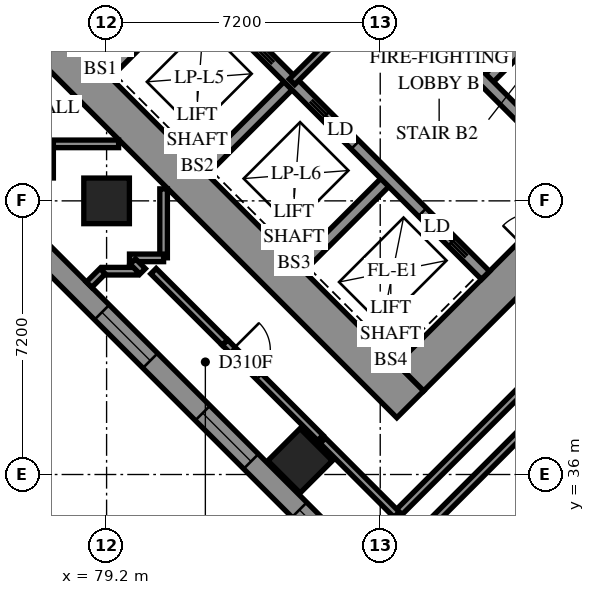
"""IFC4 building model, lengths in metres.
Left out: names, types, materials, properties, quantities, classifications, styles, units other than length and angle.
Written with IfcOpenShell. Run it as: python <this file> out.ifc"""

import sys

from ifc_helpers import new_model, si_unit, direction, frame, frame_2d, origin, origin_2d, place, context, subcontext, project, spatial, polyline, rectangle, outline, extrude, element, fill, save


model = new_model("IFC4")
c1 = context("Model", 3, precision=1e-05, world=origin(), true_north=direction((0.0, 1.0)))
c2 = subcontext(c1, "Body", "Model", "MODEL_VIEW")
j1 = project(units=[si_unit("LENGTHUNIT", "METRE"), si_unit("PLANEANGLEUNIT", "RADIAN")], contexts=[c1])
p1 = place(None, origin())
s1 = spatial("IfcSite", under=j1, at=p1, CompositionType="ELEMENT")
p2 = place(p1, origin())
s2 = spatial("IfcBuilding", under=s1, at=p2, CompositionType="ELEMENT")
p3 = place(p2, frame((0.0, 0.0, 14.4)))
s3 = spatial("IfcBuildingStorey", under=s2, at=p3, CompositionType="ELEMENT", Elevation=14.4)
for number, where, z_axis, x_axis in (
    (1, (79.2, 43.2, 0.0), (0.0, 0.0, 1.0), (1.0, 0.0, 0.0)),
    (2, (84.291, 36.362, 0.0), (0.0, 0.0, 1.0), (0.707, -0.707, 0.0)),
):
    element("IfcColumn", number, at=place(p3, frame(where, z_axis=z_axis, x_axis=x_axis)), inside=s3, PredefinedType="COLUMN", context=c2, shape_type="SweptSolid", body=[
        extrude(rectangle(XDim=1.2, YDim=1.2, at=origin_2d()), origin(), (0.0, 0.0, 1.0), 3.8),
    ])
p4 = place(p3, frame((75.594, 49.443, -0.4), z_axis=(0.0, 0.0, 1.0), x_axis=(0.7071037324, -0.70710983, 0.0)))
e3 = element("IfcWall", 3, at=p4, inside=s3, PredefinedType="SHEAR", context=c2, shape_type="SweptSolid", body=[
    extrude(rectangle(XDim=16.4, YDim=1.0, at=frame_2d((8.2, 0.0))), origin(), (0.0, 0.0, 1.0), 3.5),
])
p5 = place(p3, frame((87.19, 38.554, -0.4), z_axis=(0.0, 0.0, 1.0), x_axis=(0.707103309, 0.7071102534, 0.0)))
e4 = element("IfcWall", 4, at=p5, inside=s3, PredefinedType="SHEAR", context=c2, shape_type="SweptSolid", body=[
    extrude(rectangle(XDim=14.4, YDim=1.0, at=frame_2d((7.2, 0.0))), origin(), (0.0, 0.0, 1.0), 3.5),
])
p6 = place(p5, frame((4.55, 0.0, 0.4)))
e5 = element("IfcOpeningElement", 5, at=p6, cuts=e4, PredefinedType="OPENING", context=c2, shape_type="SweptSolid", body=[
    extrude(rectangle(XDim=1.1, YDim=2.1, at=frame_2d((0.55, 1.05))), frame((0.0, 0.51, 0.0), z_axis=(0.0, -1.0, 0.0), x_axis=(1.0, 0.0, 0.0)), (0.0, 0.0, 1.0), 1.02),
])
p7 = place(p5, frame((11.35, 0.0, 0.4)))
e6 = element("IfcOpeningElement", 6, at=p7, cuts=e4, PredefinedType="OPENING", context=c2, shape_type="SweptSolid", body=[
    extrude(rectangle(XDim=1.1, YDim=2.1, at=frame_2d((0.55, 1.05))), frame((0.0, 0.51, 0.0), z_axis=(0.0, -1.0, 0.0), x_axis=(1.0, 0.0, 0.0)), (0.0, 0.0, 1.0), 1.02),
])
p8 = place(p3, frame((79.2, 46.544, 0.0), z_axis=(0.0, 0.0, 1.0), x_axis=(0.7071219326, 0.7070916295, 0.0)))
e7 = element("IfcWall", 7, at=p8, inside=s3, PredefinedType="SOLIDWALL", context=c2, shape_type="SweptSolid", body=[
    extrude(rectangle(XDim=3.3, YDim=0.3, at=frame_2d((1.65, 0.0))), origin(), (0.0, 0.0, 1.0), 3.8),
])
for number, where, z_axis, x_axis in (
    (8, (81.746, 43.999, 0.0), (0.0, 0.0, 1.0), (0.707, 0.707, 0.0)),
    (9, (84.291, 41.453, 0.0), (0.0, 0.0, 1.0), (0.707, 0.707, 0.0)),
):
    element("IfcWall", number, at=place(p3, frame(where, z_axis=z_axis, x_axis=x_axis)), inside=s3, PredefinedType="SOLIDWALL", context=c2, shape_type="SweptSolid", body=[
        extrude(rectangle(XDim=3.3, YDim=0.3, at=frame_2d((1.65, 0.0))), origin(), (0.0, 0.0, 1.0), 3.8),
    ])
p9 = place(p3, frame((89.17, 46.332, 0.0), z_axis=(0.0, 0.0, 1.0), x_axis=(0.7071067812, 0.7071067812, 0.0)))
e10 = element("IfcWall", 10, at=p9, inside=s3, PredefinedType="SOLIDWALL", context=c2, shape_type="SweptSolid", body=[
    extrude(rectangle(XDim=3.3, YDim=0.3, at=frame_2d((1.65, 0.0))), origin(), (0.0, 0.0, 1.0), 3.8),
])
p10 = place(p3, frame((78.988, 51.423, 0.0), z_axis=(0.0, 0.0, 1.0), x_axis=(0.7071067812, -0.7071067812, 0.0)))
e11 = element("IfcWall", 11, at=p10, inside=s3, PredefinedType="SOLIDWALL", context=c2, shape_type="SweptSolid", body=[
    extrude(rectangle(XDim=14.4, YDim=0.3, at=frame_2d((7.2, 0.0))), origin(), (0.0, 0.0, 1.0), 3.8),
])
p11 = place(p10, frame((1.25, 0.0, 0.0)))
e12 = element("IfcOpeningElement", 12, at=p11, cuts=e11, PredefinedType="OPENING", context=c2, shape_type="SweptSolid", body=[
    extrude(rectangle(XDim=1.1, YDim=2.1, at=frame_2d((0.55, 1.05))), frame((0.0, 0.16, 0.0), z_axis=(0.0, -1.0, 0.0), x_axis=(1.0, 0.0, 0.0)), (0.0, 0.0, 1.0), 0.32),
])
p12 = place(p10, frame((4.85, 0.0, 0.0)))
e13 = element("IfcOpeningElement", 13, at=p12, cuts=e11, PredefinedType="OPENING", context=c2, shape_type="SweptSolid", body=[
    extrude(rectangle(XDim=1.1, YDim=2.1, at=frame_2d((0.55, 1.05))), frame((0.0, 0.16, 0.0), z_axis=(0.0, -1.0, 0.0), x_axis=(1.0, 0.0, 0.0)), (0.0, 0.0, 1.0), 0.32),
])
p13 = place(p10, frame((8.45, 0.0, 0.0)))
e14 = element("IfcOpeningElement", 14, at=p13, cuts=e11, PredefinedType="OPENING", context=c2, shape_type="SweptSolid", body=[
    extrude(rectangle(XDim=1.1, YDim=2.1, at=frame_2d((0.55, 1.05))), frame((0.0, 0.16, 0.0), z_axis=(0.0, -1.0, 0.0), x_axis=(1.0, 0.0, 0.0)), (0.0, 0.0, 1.0), 0.32),
])
p14 = place(p10, frame((12.05, 0.0, 0.0)))
e15 = element("IfcOpeningElement", 15, at=p14, cuts=e11, PredefinedType="OPENING", context=c2, shape_type="SweptSolid", body=[
    extrude(rectangle(XDim=1.1, YDim=2.1, at=frame_2d((0.55, 1.05))), frame((0.0, 0.16, 0.0), z_axis=(0.0, -1.0, 0.0), x_axis=(1.0, 0.0, 0.0)), (0.0, 0.0, 1.0), 0.32),
])
p15 = place(p3, frame((81.534, 53.969, 0.0), z_axis=(0.0, 0.0, 1.0), x_axis=(0.707103309, -0.7071102534, 0.0)))
e16 = element("IfcWall", 16, at=p15, inside=s3, PredefinedType="SOLIDWALL", context=c2, shape_type="SweptSolid", body=[
    extrude(rectangle(XDim=14.4, YDim=0.3, at=frame_2d((7.2, 0.0))), origin(), (0.0, 0.0, 1.0), 3.8),
])
p16 = place(p15, frame((12.05, 0.0, 0.0)))
e17 = element("IfcOpeningElement", 17, at=p16, cuts=e16, PredefinedType="OPENING", context=c2, shape_type="SweptSolid", body=[
    extrude(rectangle(XDim=1.1, YDim=2.1, at=frame_2d((0.55, 1.05))), frame((0.0, 0.16, 0.0), z_axis=(0.0, -1.0, 0.0), x_axis=(1.0, 0.0, 0.0)), (0.0, 0.0, 1.0), 0.32),
])
p17 = place(p3, frame((88.958, 51.211, 0.0), z_axis=(0.0, 0.0, 1.0), x_axis=(0.7070998367, -0.7071137256, 0.0)))
e18 = element("IfcWall", 18, at=p17, inside=s3, PredefinedType="SOLIDWALL", context=c2, shape_type="SweptSolid", body=[
    extrude(rectangle(XDim=7.2, YDim=0.3, at=frame_2d((3.6, 0.0))), origin(), (0.0, 0.0, 1.0), 3.8),
])
p18 = place(p3, frame((117.843, 34.665, 0.0), z_axis=(0.0, 0.0, 1.0), x_axis=(-0.7071067812, 0.7071067812, 0.0)))
e19 = element("IfcWall", 19, at=p18, inside=s3, PredefinedType="SOLIDWALL", context=c2, shape_type="SweptSolid", body=[
    extrude(outline(polyline([(-0.275, -0.275), (54.222, -0.275), (53.994, 0.275), (0.275, 0.275), (-0.275, -0.275)])), origin(), (0.0, 0.0, 1.0), 3.8),
])
p19 = place(p18, frame((0.8, 0.0, 0.7)))
e20 = element("IfcOpeningElement", 20, at=p19, cuts=e19, PredefinedType="OPENING", context=c2, shape_type="SweptSolid", body=[
    extrude(rectangle(XDim=1.8, YDim=2.6, at=frame_2d((0.9, 1.3))), frame((0.0, 0.285, 0.0), z_axis=(0.0, -1.0, 0.0), x_axis=(1.0, 0.0, 0.0)), (0.0, 0.0, 1.0), 0.57),
])
p20 = place(p18, frame((4.225, 0.0, 0.7)))
e21 = element("IfcOpeningElement", 21, at=p20, cuts=e19, PredefinedType="OPENING", context=c2, shape_type="SweptSolid", body=[
    extrude(rectangle(XDim=1.8, YDim=2.6, at=frame_2d((0.9, 1.3))), frame((0.0, 0.285, 0.0), z_axis=(0.0, -1.0, 0.0), x_axis=(1.0, 0.0, 0.0)), (0.0, 0.0, 1.0), 0.57),
])
p21 = place(p18, frame((7.825, 0.0, 0.7)))
e22 = element("IfcOpeningElement", 22, at=p21, cuts=e19, PredefinedType="OPENING", context=c2, shape_type="SweptSolid", body=[
    extrude(rectangle(XDim=1.8, YDim=2.6, at=frame_2d((0.9, 1.3))), frame((0.0, 0.285, 0.0), z_axis=(0.0, -1.0, 0.0), x_axis=(1.0, 0.0, 0.0)), (0.0, 0.0, 1.0), 0.57),
])
p22 = place(p18, frame((11.425, 0.0, 0.7)))
e23 = element("IfcOpeningElement", 23, at=p22, cuts=e19, PredefinedType="OPENING", context=c2, shape_type="SweptSolid", body=[
    extrude(rectangle(XDim=1.8, YDim=2.6, at=frame_2d((0.9, 1.3))), frame((0.0, 0.285, 0.0), z_axis=(0.0, -1.0, 0.0), x_axis=(1.0, 0.0, 0.0)), (0.0, 0.0, 1.0), 0.57),
])
p23 = place(p18, frame((15.025, 0.0, 0.7)))
e24 = element("IfcOpeningElement", 24, at=p23, cuts=e19, PredefinedType="OPENING", context=c2, shape_type="SweptSolid", body=[
    extrude(rectangle(XDim=1.8, YDim=2.6, at=frame_2d((0.9, 1.3))), frame((0.0, 0.285, 0.0), z_axis=(0.0, -1.0, 0.0), x_axis=(1.0, 0.0, 0.0)), (0.0, 0.0, 1.0), 0.57),
])
p24 = place(p18, frame((18.625, 0.0, 0.7)))
e25 = element("IfcOpeningElement", 25, at=p24, cuts=e19, PredefinedType="OPENING", context=c2, shape_type="SweptSolid", body=[
    extrude(rectangle(XDim=1.8, YDim=2.6, at=frame_2d((0.9, 1.3))), frame((0.0, 0.285, 0.0), z_axis=(0.0, -1.0, 0.0), x_axis=(1.0, 0.0, 0.0)), (0.0, 0.0, 1.0), 0.57),
])
p25 = place(p18, frame((22.225, 0.0, 0.7)))
e26 = element("IfcOpeningElement", 26, at=p25, cuts=e19, PredefinedType="OPENING", context=c2, shape_type="SweptSolid", body=[
    extrude(rectangle(XDim=1.8, YDim=2.6, at=frame_2d((0.9, 1.3))), frame((0.0, 0.285, 0.0), z_axis=(0.0, -1.0, 0.0), x_axis=(1.0, 0.0, 0.0)), (0.0, 0.0, 1.0), 0.57),
])
p26 = place(p18, frame((25.825, 0.0, 0.7)))
e27 = element("IfcOpeningElement", 27, at=p26, cuts=e19, PredefinedType="OPENING", context=c2, shape_type="SweptSolid", body=[
    extrude(rectangle(XDim=1.8, YDim=2.6, at=frame_2d((0.9, 1.3))), frame((0.0, 0.285, 0.0), z_axis=(0.0, -1.0, 0.0), x_axis=(1.0, 0.0, 0.0)), (0.0, 0.0, 1.0), 0.57),
])
p27 = place(p18, frame((29.425, 0.0, 0.7)))
e28 = element("IfcOpeningElement", 28, at=p27, cuts=e19, PredefinedType="OPENING", context=c2, shape_type="SweptSolid", body=[
    extrude(rectangle(XDim=1.8, YDim=2.6, at=frame_2d((0.9, 1.3))), frame((0.0, 0.285, 0.0), z_axis=(0.0, -1.0, 0.0), x_axis=(1.0, 0.0, 0.0)), (0.0, 0.0, 1.0), 0.57),
])
p28 = place(p18, frame((33.025, 0.0, 0.7)))
e29 = element("IfcOpeningElement", 29, at=p28, cuts=e19, PredefinedType="OPENING", context=c2, shape_type="SweptSolid", body=[
    extrude(rectangle(XDim=1.8, YDim=2.6, at=frame_2d((0.9, 1.3))), frame((0.0, 0.285, 0.0), z_axis=(0.0, -1.0, 0.0), x_axis=(1.0, 0.0, 0.0)), (0.0, 0.0, 1.0), 0.57),
])
p29 = place(p18, frame((36.625, 0.0, 0.7)))
e30 = element("IfcOpeningElement", 30, at=p29, cuts=e19, PredefinedType="OPENING", context=c2, shape_type="SweptSolid", body=[
    extrude(rectangle(XDim=1.8, YDim=2.6, at=frame_2d((0.9, 1.3))), frame((0.0, 0.285, 0.0), z_axis=(0.0, -1.0, 0.0), x_axis=(1.0, 0.0, 0.0)), (0.0, 0.0, 1.0), 0.57),
])
p30 = place(p18, frame((40.225, 0.0, 0.7)))
e31 = element("IfcOpeningElement", 31, at=p30, cuts=e19, PredefinedType="OPENING", context=c2, shape_type="SweptSolid", body=[
    extrude(rectangle(XDim=1.8, YDim=2.6, at=frame_2d((0.9, 1.3))), frame((0.0, 0.285, 0.0), z_axis=(0.0, -1.0, 0.0), x_axis=(1.0, 0.0, 0.0)), (0.0, 0.0, 1.0), 0.57),
])
p31 = place(p18, frame((43.825, 0.0, 0.7)))
e32 = element("IfcOpeningElement", 32, at=p31, cuts=e19, PredefinedType="OPENING", context=c2, shape_type="SweptSolid", body=[
    extrude(rectangle(XDim=1.8, YDim=2.6, at=frame_2d((0.9, 1.3))), frame((0.0, 0.285, 0.0), z_axis=(0.0, -1.0, 0.0), x_axis=(1.0, 0.0, 0.0)), (0.0, 0.0, 1.0), 0.57),
])
p32 = place(p18, frame((47.425, 0.0, 0.7)))
e33 = element("IfcOpeningElement", 33, at=p32, cuts=e19, PredefinedType="OPENING", context=c2, shape_type="SweptSolid", body=[
    extrude(rectangle(XDim=1.8, YDim=2.6, at=frame_2d((0.9, 1.3))), frame((0.0, 0.285, 0.0), z_axis=(0.0, -1.0, 0.0), x_axis=(1.0, 0.0, 0.0)), (0.0, 0.0, 1.0), 0.57),
])
p33 = place(p18, frame((51.06, 0.0, 0.7)))
e34 = element("IfcOpeningElement", 34, at=p33, cuts=e19, PredefinedType="OPENING", context=c2, shape_type="SweptSolid", body=[
    extrude(rectangle(XDim=1.8, YDim=2.6, at=frame_2d((0.9, 1.3))), frame((0.0, 0.285, 0.0), z_axis=(0.0, -1.0, 0.0), x_axis=(1.0, 0.0, 0.0)), (0.0, 0.0, 1.0), 0.57),
])
p34 = place(p3, frame((77.07, 42.275, 0.0), z_axis=(0.0, 0.0, 1.0), x_axis=(0.7071067812, -0.7071067812, 0.0)))
e35 = element("IfcWall", 35, at=p34, inside=s3, PredefinedType="SOLIDWALL", context=c2, shape_type="SweptSolid", body=[
    extrude(outline(polyline([(0.114, -0.275), (39.288, -0.275), (38.737, 0.275), (-0.114, 0.275), (0.114, -0.275)])), origin(), (0.0, 0.0, 1.0), 3.8),
])
p35 = place(p34, frame((2.837, 0.0, 0.7)))
e36 = element("IfcOpeningElement", 36, at=p35, cuts=e35, PredefinedType="OPENING", context=c2, shape_type="SweptSolid", body=[
    extrude(rectangle(XDim=1.8, YDim=2.6, at=frame_2d((0.9, 1.3))), frame((0.0, 0.285, 0.0), z_axis=(0.0, -1.0, 0.0), x_axis=(1.0, 0.0, 0.0)), (0.0, 0.0, 1.0), 0.57),
])
p36 = place(p34, frame((6.588, 0.0, 0.7)))
e37 = element("IfcOpeningElement", 37, at=p36, cuts=e35, PredefinedType="OPENING", context=c2, shape_type="SweptSolid", body=[
    extrude(rectangle(XDim=1.8, YDim=2.6, at=frame_2d((0.9, 1.3))), frame((0.0, 0.285, 0.0), z_axis=(0.0, -1.0, 0.0), x_axis=(1.0, 0.0, 0.0)), (0.0, 0.0, 1.0), 0.57),
])
p37 = place(p34, frame((10.188, 0.0, 0.7)))
e38 = element("IfcOpeningElement", 38, at=p37, cuts=e35, PredefinedType="OPENING", context=c2, shape_type="SweptSolid", body=[
    extrude(rectangle(XDim=1.8, YDim=2.6, at=frame_2d((0.9, 1.3))), frame((0.0, 0.285, 0.0), z_axis=(0.0, -1.0, 0.0), x_axis=(1.0, 0.0, 0.0)), (0.0, 0.0, 1.0), 0.57),
])
p38 = place(p34, frame((13.787, 0.0, 0.7)))
e39 = element("IfcOpeningElement", 39, at=p38, cuts=e35, PredefinedType="OPENING", context=c2, shape_type="SweptSolid", body=[
    extrude(rectangle(XDim=1.8, YDim=2.6, at=frame_2d((0.9, 1.3))), frame((0.0, 0.285, 0.0), z_axis=(0.0, -1.0, 0.0), x_axis=(1.0, 0.0, 0.0)), (0.0, 0.0, 1.0), 0.57),
])
p39 = place(p34, frame((17.387, 0.0, 0.7)))
e40 = element("IfcOpeningElement", 40, at=p39, cuts=e35, PredefinedType="OPENING", context=c2, shape_type="SweptSolid", body=[
    extrude(rectangle(XDim=1.8, YDim=2.6, at=frame_2d((0.9, 1.3))), frame((0.0, 0.285, 0.0), z_axis=(0.0, -1.0, 0.0), x_axis=(1.0, 0.0, 0.0)), (0.0, 0.0, 1.0), 0.57),
])
p40 = place(p34, frame((20.988, 0.0, 0.7)))
e41 = element("IfcOpeningElement", 41, at=p40, cuts=e35, PredefinedType="OPENING", context=c2, shape_type="SweptSolid", body=[
    extrude(rectangle(XDim=1.8, YDim=2.6, at=frame_2d((0.9, 1.3))), frame((0.0, 0.285, 0.0), z_axis=(0.0, -1.0, 0.0), x_axis=(1.0, 0.0, 0.0)), (0.0, 0.0, 1.0), 0.57),
])
p41 = place(p34, frame((24.587, 0.0, 0.7)))
e42 = element("IfcOpeningElement", 42, at=p41, cuts=e35, PredefinedType="OPENING", context=c2, shape_type="SweptSolid", body=[
    extrude(rectangle(XDim=1.8, YDim=2.6, at=frame_2d((0.9, 1.3))), frame((0.0, 0.285, 0.0), z_axis=(0.0, -1.0, 0.0), x_axis=(1.0, 0.0, 0.0)), (0.0, 0.0, 1.0), 0.57),
])
p42 = place(p34, frame((28.188, 0.0, 0.7)))
e43 = element("IfcOpeningElement", 43, at=p42, cuts=e35, PredefinedType="OPENING", context=c2, shape_type="SweptSolid", body=[
    extrude(rectangle(XDim=1.8, YDim=2.6, at=frame_2d((0.9, 1.3))), frame((0.0, 0.285, 0.0), z_axis=(0.0, -1.0, 0.0), x_axis=(1.0, 0.0, 0.0)), (0.0, 0.0, 1.0), 0.57),
])
p43 = place(p34, frame((31.788, 0.0, 0.7)))
e44 = element("IfcOpeningElement", 44, at=p43, cuts=e35, PredefinedType="OPENING", context=c2, shape_type="SweptSolid", body=[
    extrude(rectangle(XDim=1.8, YDim=2.6, at=frame_2d((0.9, 1.3))), frame((0.0, 0.285, 0.0), z_axis=(0.0, -1.0, 0.0), x_axis=(1.0, 0.0, 0.0)), (0.0, 0.0, 1.0), 0.57),
])
p44 = place(p34, frame((35.388, 0.0, 0.7)))
e45 = element("IfcOpeningElement", 45, at=p44, cuts=e35, PredefinedType="OPENING", context=c2, shape_type="SweptSolid", body=[
    extrude(rectangle(XDim=1.8, YDim=2.6, at=frame_2d((0.9, 1.3))), frame((0.0, 0.285, 0.0), z_axis=(0.0, -1.0, 0.0), x_axis=(1.0, 0.0, 0.0)), (0.0, 0.0, 1.0), 0.57),
])
p45 = place(p3, frame((84.079, 46.332, 0.0), z_axis=(0.0, 0.0, 1.0), x_axis=(0.7071067812, 0.7071067812, 0.0)))
e46 = element("IfcWall", 46, at=p45, inside=s3, PredefinedType="PARTITIONING", context=c2, shape_type="SweptSolid", body=[
    extrude(rectangle(XDim=3.6, YDim=0.2, at=frame_2d((1.8, 0.0))), origin(), (0.0, 0.0, 1.0), 3.8),
])
p46 = place(p3, frame((86.376, 33.357, 0.0), z_axis=(0.0, 0.0, 1.0), x_axis=(0.7071020419, 0.7071115204, 0.0)))
e47 = element("IfcWall", 47, at=p46, inside=s3, PredefinedType="PARTITIONING", context=c2, shape_type="SweptSolid", body=[
    extrude(rectangle(XDim=10.55, YDim=0.2, at=frame_2d((5.275, 0.0))), origin(), (0.0, 0.0, 1.0), 3.8),
])
p47 = place(p3, frame((86.836, 34.948, 0.0), z_axis=(0.0, 0.0, 1.0), x_axis=(0.7071067812, 0.7071067812, 0.0)))
e48 = element("IfcWall", 48, at=p47, inside=s3, PredefinedType="PARTITIONING", context=c2, shape_type="SweptSolid", body=[
    extrude(rectangle(XDim=9.099, YDim=0.2, at=frame_2d((4.55, 0.0))), origin(), (0.0, 0.0, 1.0), 3.8),
])
p48 = place(p3, frame((82.314, 39.476, 0.0), z_axis=(0.0, 0.0, 1.0), x_axis=(0.7068251215, -0.7073883287, 0.0)))
e49 = element("IfcWall", 49, at=p48, inside=s3, PredefinedType="PARTITIONING", context=c2, shape_type="SweptSolid", body=[
    extrude(rectangle(XDim=3.551, YDim=0.2, at=frame_2d((1.776, 0.0))), origin(), (0.0, 0.0, 1.0), 3.8),
])
p49 = place(p48, frame((0.275, 0.0, 0.0)))
e50 = element("IfcOpeningElement", 50, at=p49, cuts=e49, PredefinedType="OPENING", context=c2, shape_type="SweptSolid", body=[
    extrude(rectangle(XDim=1.0, YDim=2.1, at=frame_2d((0.5, 1.05))), frame((0.0, 0.11, 0.0), z_axis=(0.0, -1.0, 0.0), x_axis=(1.0, 0.0, 0.0)), (0.0, 0.0, 1.0), 0.22),
])
p50 = place(p3, frame((84.889, 36.889, 0.0), z_axis=(0.0, 0.0, 1.0), x_axis=(0.7071067812, -0.7071067812, 0.0)))
e51 = element("IfcWall", 51, at=p50, inside=s3, PredefinedType="PARTITIONING", context=c2, shape_type="SweptSolid", body=[
    extrude(rectangle(XDim=2.749, YDim=0.2, at=frame_2d((1.375, 0.0))), origin(), (0.0, 0.0, 1.0), 3.8),
])
p51 = place(p3, frame((80.434, 41.35, 0.0), z_axis=(0.0, 0.0, 1.0), x_axis=(0.7074834026, -0.7067299591, 0.0)))
e52 = element("IfcWall", 52, at=p51, inside=s3, PredefinedType="PARTITIONING", context=c2, shape_type="SweptSolid", body=[
    extrude(rectangle(XDim=2.655, YDim=0.2, at=frame_2d((1.327, 0.0))), origin(), (0.0, 0.0, 1.0), 3.8),
])
for number, where, z_axis, x_axis in (
    (53, (77.702, 44.7, 0.0), (0.0, 0.0, 1.0), (1.0, 0.0, 0.0)),
    (54, (80.7, 41.702, 0.0), (0.0, 0.0, 1.0), (0.0, 1.0, 0.0)),
):
    element("IfcWall", number, at=place(p3, frame(where, z_axis=z_axis, x_axis=x_axis)), inside=s3, PredefinedType="PARTITIONING", context=c2, shape_type="SweptSolid", body=[
        extrude(rectangle(XDim=1.814, YDim=0.2, at=frame_2d((0.907, 0.0))), origin(), (0.0, 0.0, 1.0), 3.8),
    ])
p52 = place(p3, frame((79.098, 41.35, 0.0), z_axis=(0.0, 0.0, 1.0), x_axis=(1.0, 0.0, 0.0)))
e55 = element("IfcWall", 55, at=p52, inside=s3, PredefinedType="PARTITIONING", context=c2, shape_type="SweptSolid", body=[
    extrude(rectangle(XDim=0.914, YDim=0.2, at=frame_2d((0.457, 0.0))), origin(), (0.0, 0.0, 1.0), 3.8),
])
for number, where, z_axis, x_axis in (
    (56, (77.7, 43.802, 0.0), (0.0, 0.0, 1.0), (0.0, 1.0, 0.0)),
    (57, (79.802, 41.7, 0.0), (0.0, 0.0, 1.0), (1.0, 0.0, 0.0)),
):
    element("IfcWall", number, at=place(p3, frame(where, z_axis=z_axis, x_axis=x_axis)), inside=s3, PredefinedType="PARTITIONING", context=c2, shape_type="SweptSolid", body=[
        extrude(rectangle(XDim=0.898, YDim=0.2, at=frame_2d((0.449, 0.0))), origin(), (0.0, 0.0, 1.0), 3.8),
    ])
p53 = place(p3, frame((79.891, 41.605, 0.0), z_axis=(0.0, 0.0, 1.0), x_axis=(0.7069697583, -0.7072437776, 0.0)))
e58 = element("IfcWall", 58, at=p53, inside=s3, PredefinedType="PARTITIONING", context=c2, shape_type="SweptSolid", body=[
    extrude(rectangle(XDim=0.365, YDim=0.2, at=frame_2d((0.182, 0.0))), origin(), (0.0, 0.0, 1.0), 3.8),
])
p54 = place(p3, frame((78.74, 40.994, 0.0), z_axis=(0.0, 0.0, 1.0), x_axis=(0.7072060451, 0.7070075033, 0.0)))
e59 = element("IfcWall", 59, at=p54, inside=s3, PredefinedType="PARTITIONING", context=c2, shape_type="SweptSolid", body=[
    extrude(rectangle(XDim=0.504, YDim=0.2, at=frame_2d((0.252, 0.0))), origin(), (0.0, 0.0, 1.0), 3.8),
])
p55 = place(p35, origin())
e60 = element("IfcWindow", 60, at=p55, inside=s3, PartitioningType="SINGLE_PANEL", PredefinedType="WINDOW", context=c2, shape_type="SweptSolid", body=[
    extrude(rectangle(XDim=1.8, YDim=2.6, at=frame_2d((0.9, 1.3))), frame((0.0, 0.155, 0.0), z_axis=(0.0, -1.0, 0.0), x_axis=(1.0, 0.0, 0.0)), (0.0, 0.0, 1.0), 0.06),
])
fill(e36, e60)
p56 = place(p36, origin())
e61 = element("IfcWindow", 61, at=p56, inside=s3, PartitioningType="SINGLE_PANEL", PredefinedType="WINDOW", context=c2, shape_type="SweptSolid", body=[
    extrude(rectangle(XDim=1.8, YDim=2.6, at=frame_2d((0.9, 1.3))), frame((0.0, 0.155, 0.0), z_axis=(0.0, -1.0, 0.0), x_axis=(1.0, 0.0, 0.0)), (0.0, 0.0, 1.0), 0.06),
])
fill(e37, e61)
p57 = place(p37, origin())
e62 = element("IfcWindow", 62, at=p57, inside=s3, PartitioningType="SINGLE_PANEL", PredefinedType="WINDOW", context=c2, shape_type="SweptSolid", body=[
    extrude(rectangle(XDim=1.8, YDim=2.6, at=frame_2d((0.9, 1.3))), frame((0.0, 0.155, 0.0), z_axis=(0.0, -1.0, 0.0), x_axis=(1.0, 0.0, 0.0)), (0.0, 0.0, 1.0), 0.06),
])
fill(e38, e62)
p58 = place(p13, origin())
e63 = element("IfcDoor", 63, at=p58, inside=s3, OperationType="SLIDING_TO_LEFT", PredefinedType="DOOR", context=c2, shape_type="SweptSolid", body=[
    extrude(rectangle(XDim=1.1, YDim=2.1, at=frame_2d((0.55, 1.05))), frame((0.0, 0.025, 0.0), z_axis=(0.0, -1.0, 0.0), x_axis=(1.0, 0.0, 0.0)), (0.0, 0.0, 1.0), 0.05),
])
fill(e14, e63)
p59 = place(p14, origin())
e64 = element("IfcDoor", 64, at=p59, inside=s3, OperationType="SLIDING_TO_RIGHT", PredefinedType="DOOR", context=c2, shape_type="SweptSolid", body=[
    extrude(rectangle(XDim=1.1, YDim=2.1, at=frame_2d((0.55, 1.05))), frame((0.0, 0.025, 0.0), z_axis=(0.0, -1.0, 0.0), x_axis=(1.0, 0.0, 0.0)), (0.0, 0.0, 1.0), 0.05),
])
fill(e15, e64)
p60 = place(p49, origin())
e65 = element("IfcDoor", 65, at=p60, inside=s3, OperationType="SINGLE_SWING_RIGHT", PredefinedType="DOOR", context=c2, shape_type="SweptSolid", body=[
    extrude(rectangle(XDim=1.0, YDim=2.1, at=frame_2d((0.5, 1.05))), frame((0.0, 0.025, 0.0), z_axis=(0.0, -1.0, 0.0), x_axis=(1.0, 0.0, 0.0)), (0.0, 0.0, 1.0), 0.05),
])
fill(e50, e65)
save(model, sys.argv[1])
